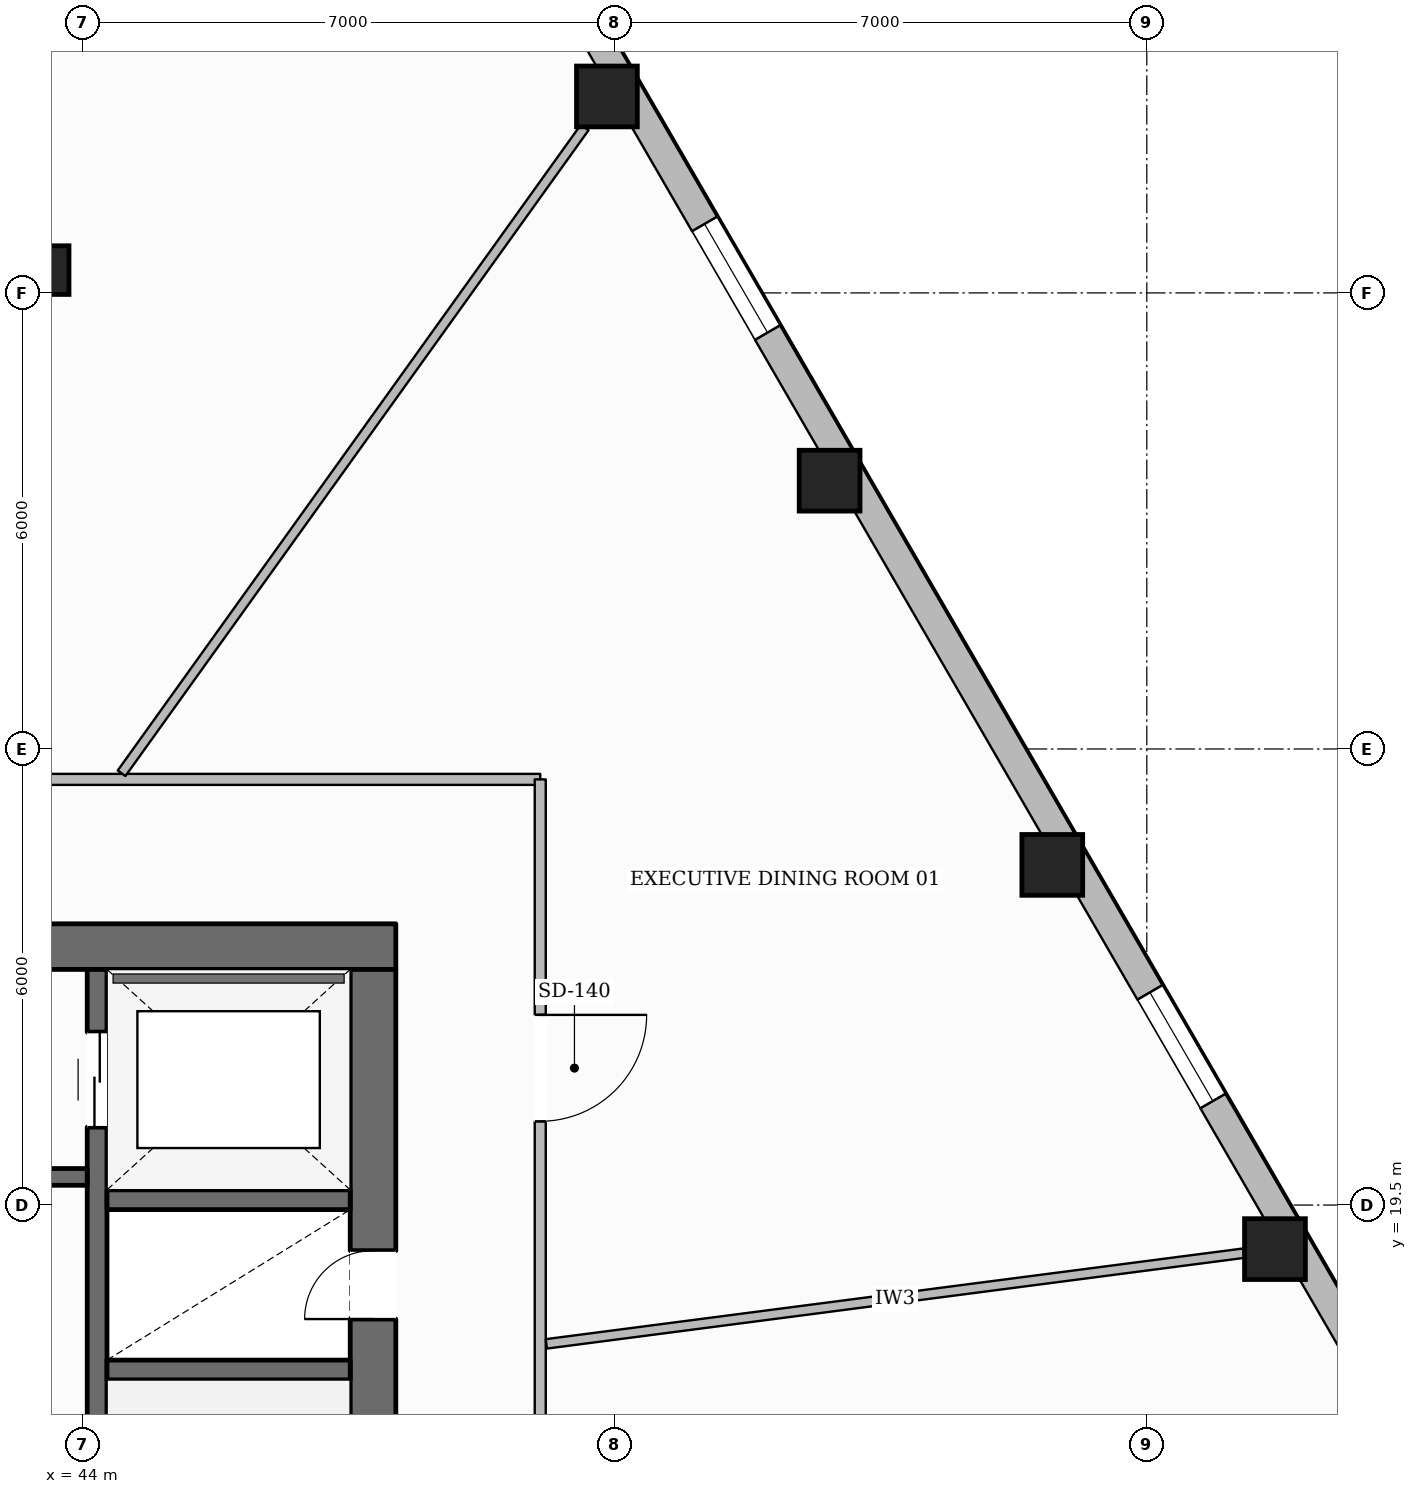
"""IFC4 building model, lengths in metres.
Left out: names, types, materials, properties, quantities, classifications, styles, units other than length and angle.
Written with IfcOpenShell. Run it as: python <this file> out.ifc"""

import sys

from ifc_helpers import new_model, si_unit, direction, frame, frame_2d, origin, origin_2d, place, context, subcontext, project, spatial, rectangle, hollow_rectangle, extrude, element, fill, save


model = new_model("IFC4")
c1 = context("Model", 3, precision=1e-05, world=origin(), true_north=direction((0.0, 1.0)))
c2 = subcontext(c1, "Body", "Model", "MODEL_VIEW")
j1 = project(units=[si_unit("LENGTHUNIT", "METRE"), si_unit("PLANEANGLEUNIT", "RADIAN")], contexts=[c1])
p1 = place(None, origin())
s1 = spatial("IfcSite", under=j1, at=p1, CompositionType="ELEMENT")
p2 = place(p1, origin())
s2 = spatial("IfcBuilding", under=s1, at=p2, CompositionType="ELEMENT")
p3 = place(p2, frame((0.0, 0.0, 67.6)))
s3 = spatial("IfcBuildingStorey", under=s2, at=p3, CompositionType="ELEMENT", Elevation=67.6)
p4 = place(p3, frame((27.88, 22.9, 0.0), z_axis=(0.0, 0.0, 1.0), x_axis=(1.0, 0.0, 0.0)))
e1 = element("IfcWall", 1, at=p4, inside=s3, PredefinedType="SOLIDWALL", context=c2, shape_type="SweptSolid", body=[
    extrude(rectangle(XDim=20.24, YDim=0.6, at=frame_2d((10.12, 0.0))), origin(), (0.0, 0.0, 1.0), 3.59),
])
p5 = place(p4, frame((6.395, 0.0, 0.0)))
e2 = element("IfcOpeningElement", 2, at=p5, cuts=e1, PredefinedType="OPENING", context=c2, shape_type="SweptSolid", body=[
    extrude(rectangle(XDim=1.05, YDim=2.15, at=frame_2d((0.525, 1.075))), frame((0.0, 0.31, 0.0), z_axis=(0.0, -1.0, 0.0), x_axis=(1.0, 0.0, 0.0)), (0.0, 0.0, 1.0), 0.62),
])
p6 = place(p4, frame((12.795, 0.0, 0.0)))
e3 = element("IfcOpeningElement", 3, at=p6, cuts=e1, PredefinedType="OPENING", context=c2, shape_type="SweptSolid", body=[
    extrude(rectangle(XDim=1.05, YDim=2.15, at=frame_2d((0.525, 1.075))), frame((0.0, 0.31, 0.0), z_axis=(0.0, -1.0, 0.0), x_axis=(1.0, 0.0, 0.0)), (0.0, 0.0, 1.0), 0.62),
])
p7 = place(p3, frame((47.82, 9.6, 0.0), z_axis=(0.0, 0.0, 1.0), x_axis=(0.0, 1.0, 0.0)))
e4 = element("IfcWall", 4, at=p7, inside=s3, PredefinedType="SOLIDWALL", context=c2, shape_type="SweptSolid", body=[
    extrude(rectangle(XDim=13.0, YDim=0.6, at=frame_2d((6.5, 0.0))), origin(), (0.0, 0.0, 1.0), 3.59),
])
p8 = place(p7, frame((0.2, 0.0, 0.0)))
e5 = element("IfcOpeningElement", 5, at=p8, cuts=e4, PredefinedType="OPENING", context=c2, shape_type="SweptSolid", body=[
    extrude(rectangle(XDim=1.1, YDim=2.15, at=frame_2d((0.55, 1.075))), frame((0.0, 0.31, 0.0), z_axis=(0.0, -1.0, 0.0), x_axis=(1.0, 0.0, 0.0)), (0.0, 0.0, 1.0), 0.62),
])
p9 = place(p7, frame((8.4, 0.0, 0.0)))
e6 = element("IfcOpeningElement", 6, at=p9, cuts=e4, PredefinedType="OPENING", context=c2, shape_type="SweptSolid", body=[
    extrude(rectangle(XDim=0.9, YDim=2.1, at=frame_2d((0.45, 1.05))), frame((0.0, 0.31, 0.0), z_axis=(0.0, -1.0, 0.0), x_axis=(1.0, 0.0, 0.0)), (0.0, 0.0, 1.0), 0.62),
])
p10 = place(p3, frame((44.19, 9.6, 0.0), z_axis=(0.0, 0.0, 1.0), x_axis=(0.0, 1.0, 0.0)))
e7 = element("IfcWall", 7, at=p10, inside=s3, PredefinedType="SHEAR", context=c2, shape_type="SweptSolid", body=[
    extrude(rectangle(XDim=13.0, YDim=0.26, at=frame_2d((6.5, 0.0))), origin(), (0.0, 0.0, 1.0), 3.59),
])
p11 = place(p10, frame((10.925, 0.0, 0.0)))
e8 = element("IfcOpeningElement", 8, at=p11, cuts=e7, PredefinedType="OPENING", context=c2, shape_type="SweptSolid", body=[
    extrude(rectangle(XDim=1.25, YDim=2.25, at=frame_2d((0.625, 1.125))), frame((0.0, 0.14, 0.0), z_axis=(0.0, -1.0, 0.0), x_axis=(1.0, 0.0, 0.0)), (0.0, 0.0, 1.0), 0.28),
])
for number, where, z_axis, x_axis in (
    (9, (44.32, 17.33, 0.0), (0.0, 0.0, 1.0), (1.0, 0.0, 0.0)),
    (10, (44.32, 19.57, 0.0), (0.0, 0.0, 1.0), (1.0, 0.0, 0.0)),
):
    element("IfcWall", number, at=place(p3, frame(where, z_axis=z_axis, x_axis=x_axis)), inside=s3, PredefinedType="SHEAR", context=c2, shape_type="SweptSolid", body=[
        extrude(rectangle(XDim=3.2, YDim=0.26, at=frame_2d((1.6, 0.0))), origin(), (0.0, 0.0, 1.0), 3.59),
    ])
p12 = place(p3, frame((31.94, 19.87, 0.0), z_axis=(0.0, 0.0, 1.0), x_axis=(1.0, 0.0, 0.0)))
e11 = element("IfcWall", 11, at=p12, inside=s3, PredefinedType="SOLIDWALL", context=c2, shape_type="SweptSolid", body=[
    extrude(rectangle(XDim=12.12, YDim=0.22, at=frame_2d((6.06, 0.0))), origin(), (0.0, 0.0, 1.0), 3.59),
])
p13 = place(p12, frame((6.3, 0.0, 0.0)))
e12 = element("IfcOpeningElement", 12, at=p13, cuts=e11, PredefinedType="OPENING", context=c2, shape_type="SweptSolid", body=[
    extrude(rectangle(XDim=1.1, YDim=2.15, at=frame_2d((0.55, 1.075))), frame((0.0, 0.12, 0.0), z_axis=(0.0, -1.0, 0.0), x_axis=(1.0, 0.0, 0.0)), (0.0, 0.0, 1.0), 0.24),
])
p14 = place(p12, frame((8.01, 0.0, 0.0)))
e13 = element("IfcOpeningElement", 13, at=p14, cuts=e11, PredefinedType="OPENING", context=c2, shape_type="SweptSolid", body=[
    extrude(rectangle(XDim=0.9, YDim=2.1, at=frame_2d((0.45, 1.05))), frame((0.0, 0.12, 0.0), z_axis=(0.0, -1.0, 0.0), x_axis=(1.0, 0.0, 0.0)), (0.0, 0.0, 1.0), 0.24),
])
p15 = place(p12, frame((10.21, 0.0, 0.0)))
e14 = element("IfcOpeningElement", 14, at=p15, cuts=e11, PredefinedType="OPENING", context=c2, shape_type="SweptSolid", body=[
    extrude(rectangle(XDim=0.9, YDim=2.1, at=frame_2d((0.45, 1.05))), frame((0.0, 0.12, 0.0), z_axis=(0.0, -1.0, 0.0), x_axis=(1.0, 0.0, 0.0)), (0.0, 0.0, 1.0), 0.24),
])
for number, where, z_axis, x_axis in (
    (15, (59.686, 18.92, 0.0), (0.0, 0.0, 1.0), (1.0, 0.0, 0.0)),
    (16, (56.757, 23.975, 0.0), (0.0, 0.0, 1.0), (1.0, 0.0, 0.0)),
    (17, (53.827, 29.03, 0.0), (0.0, 0.0, 1.0), (1.0, 0.0, 0.0)),
    (18, (50.897, 34.084, 0.0), (0.0, 0.0, 1.0), (1.0, 0.0, 0.0)),
):
    element("IfcColumn", number, at=place(p3, frame(where, z_axis=z_axis, x_axis=x_axis)), inside=s3, PredefinedType="COLUMN", context=c2, shape_type="SweptSolid", body=[
        extrude(hollow_rectangle(XDim=0.8, YDim=0.8, WallThickness=0.036, at=origin_2d()), origin(), (0.0, 0.0, 1.0), 3.59),
    ])
p16 = place(p3, frame((43.5, 31.8, 0.0), z_axis=(0.0, 0.0, 1.0), x_axis=(1.0, 0.0, 0.0)))
e19 = element("IfcColumn", 19, at=p16, inside=s3, PredefinedType="COLUMN", context=c2, shape_type="SweptSolid", body=[
    extrude(hollow_rectangle(XDim=0.64, YDim=0.64, WallThickness=0.028, at=origin_2d()), origin(), (0.0, 0.0, 1.0), 3.59),
])
p17 = place(p3, frame((45.032, 44.743, 0.0), z_axis=(0.0, 0.0, 1.0), x_axis=(0.501444024373, -0.865190089183, 0.0)))
e20 = element("IfcWall", 20, at=p17, inside=s3, PredefinedType="STANDARD", context=c2, shape_type="SweptSolid", body=[
    extrude(rectangle(XDim=36.012, YDim=0.38, at=frame_2d((18.006, 0.0))), origin(), (0.0, 0.0, 1.0), 2.97),
])
p18 = place(p17, frame((31.786, 0.0, 0.65)))
e21 = element("IfcOpeningElement", 21, at=p18, cuts=e20, PredefinedType="OPENING", context=c2, shape_type="SweptSolid", body=[
    extrude(rectangle(XDim=1.65, YDim=1.75, at=frame_2d((0.825, 0.875))), frame((0.0, 0.2, 0.0), z_axis=(0.0, -1.0, 0.0), x_axis=(1.0, 0.0, 0.0)), (0.0, 0.0, 1.0), 0.4),
])
p19 = place(p17, frame((25.944, 0.0, 0.65)))
e22 = element("IfcOpeningElement", 22, at=p19, cuts=e20, PredefinedType="OPENING", context=c2, shape_type="SweptSolid", body=[
    extrude(rectangle(XDim=1.65, YDim=1.75, at=frame_2d((0.825, 0.875))), frame((0.0, 0.2, 0.0), z_axis=(0.0, -1.0, 0.0), x_axis=(1.0, 0.0, 0.0)), (0.0, 0.0, 1.0), 0.4),
])
p20 = place(p17, frame((14.259, 0.0, 0.65)))
e23 = element("IfcOpeningElement", 23, at=p20, cuts=e20, PredefinedType="OPENING", context=c2, shape_type="SweptSolid", body=[
    extrude(rectangle(XDim=1.65, YDim=1.75, at=frame_2d((0.825, 0.875))), frame((0.0, 0.2, 0.0), z_axis=(0.0, -1.0, 0.0), x_axis=(1.0, 0.0, 0.0)), (0.0, 0.0, 1.0), 0.4),
])
p21 = place(p17, frame((8.417, 0.0, 0.65)))
e24 = element("IfcOpeningElement", 24, at=p21, cuts=e20, PredefinedType="OPENING", context=c2, shape_type="SweptSolid", body=[
    extrude(rectangle(XDim=1.65, YDim=1.75, at=frame_2d((0.825, 0.875))), frame((0.0, 0.2, 0.0), z_axis=(0.0, -1.0, 0.0), x_axis=(1.0, 0.0, 0.0)), (0.0, 0.0, 1.0), 0.4),
])
p22 = place(p17, frame((2.574, 0.0, 0.65)))
e25 = element("IfcOpeningElement", 25, at=p22, cuts=e20, PredefinedType="OPENING", context=c2, shape_type="SweptSolid", body=[
    extrude(rectangle(XDim=1.65, YDim=1.75, at=frame_2d((0.825, 0.875))), frame((0.0, 0.2, 0.0), z_axis=(0.0, -1.0, 0.0), x_axis=(1.0, 0.0, 0.0)), (0.0, 0.0, 1.0), 0.4),
])
p23 = place(p3, frame((39.0, 25.1, 0.0), z_axis=(0.0, 0.0, 1.0), x_axis=(1.0, 0.0, 0.0)))
e26 = element("IfcWall", 26, at=p23, inside=s3, PredefinedType="PARTITIONING", context=c2, shape_type="SweptSolid", body=[
    extrude(rectangle(XDim=11.02, YDim=0.145, at=frame_2d((5.51, 0.0))), origin(), (0.0, 0.0, 1.0), 3.59),
])
p24 = place(p3, frame((50.02, 25.1, 0.0), z_axis=(0.0, 0.0, 1.0), x_axis=(0.0, -1.0, 0.0)))
e27 = element("IfcWall", 27, at=p24, inside=s3, PredefinedType="PARTITIONING", context=c2, shape_type="SweptSolid", body=[
    extrude(rectangle(XDim=16.0, YDim=0.145, at=frame_2d((8.0, 0.0))), origin(), (0.0, 0.0, 1.0), 3.278),
])
p25 = place(p24, frame((3.098, 0.0, 0.0)))
e28 = element("IfcOpeningElement", 28, at=p25, cuts=e27, PredefinedType="OPENING", context=c2, shape_type="SweptSolid", body=[
    extrude(rectangle(XDim=1.4, YDim=2.2, at=frame_2d((0.7, 1.1))), frame((0.0, 0.083, 0.0), z_axis=(0.0, -1.0, 0.0), x_axis=(1.0, 0.0, 0.0)), (0.0, 0.0, 1.0), 0.165),
])
p26 = place(p24, frame((10.927, 0.0, 0.0)))
e29 = element("IfcOpeningElement", 29, at=p26, cuts=e27, PredefinedType="OPENING", context=c2, shape_type="SweptSolid", body=[
    extrude(rectangle(XDim=1.4, YDim=2.2, at=frame_2d((0.7, 1.1))), frame((0.0, 0.083, 0.0), z_axis=(0.0, -1.0, 0.0), x_axis=(1.0, 0.0, 0.0)), (0.0, 0.0, 1.0), 0.165),
])
p27 = place(p3, frame((50.101, 17.674, 0.0), z_axis=(0.0, 0.0, 1.0), x_axis=(0.991648297641, 0.128971523162, 0.0)))
e30 = element("IfcWall", 30, at=p27, inside=s3, PredefinedType="PARTITIONING", context=c2, shape_type="SweptSolid", body=[
    extrude(rectangle(XDim=9.255, YDim=0.125, at=frame_2d((4.627, 0.0))), origin(), (0.0, 0.0, 1.0), 3.057),
])
p28 = place(p3, frame((44.512, 25.18, 0.0), z_axis=(0.0, 0.0, 1.0), x_axis=(0.582750338363, 0.812651243239, 0.0)))
e31 = element("IfcWall", 31, at=p28, inside=s3, PredefinedType="PARTITIONING", context=c2, shape_type="SweptSolid", body=[
    extrude(rectangle(XDim=10.455, YDim=0.125, at=frame_2d((5.228, 0.0))), origin(), (0.0, 0.0, 1.0), 3.057),
])
p29 = place(p19, origin())
e32 = element("IfcWindow", 32, at=p29, inside=s3, PartitioningType="SINGLE_PANEL", PredefinedType="WINDOW", context=c2, shape_type="SweptSolid", body=[
    extrude(rectangle(XDim=1.65, YDim=1.75, at=frame_2d((0.825, 0.875))), frame((0.0, 0.03, 0.0), z_axis=(0.0, -1.0, 0.0), x_axis=(1.0, 0.0, 0.0)), (0.0, 0.0, 1.0), 0.06),
])
fill(e22, e32)
p30 = place(p20, origin())
e33 = element("IfcWindow", 33, at=p30, inside=s3, PartitioningType="SINGLE_PANEL", PredefinedType="WINDOW", context=c2, shape_type="SweptSolid", body=[
    extrude(rectangle(XDim=1.65, YDim=1.75, at=frame_2d((0.825, 0.875))), frame((0.0, 0.03, 0.0), z_axis=(0.0, -1.0, 0.0), x_axis=(1.0, 0.0, 0.0)), (0.0, 0.0, 1.0), 0.06),
])
fill(e23, e33)
p31 = place(p9, origin())
e34 = element("IfcDoor", 34, at=p31, inside=s3, OperationType="SINGLE_SWING_LEFT", PredefinedType="DOOR", context=c2, shape_type="SweptSolid", body=[
    extrude(rectangle(XDim=0.9, YDim=2.1, at=frame_2d((0.45, 1.05))), frame((0.0, 0.025, 0.0), z_axis=(0.0, -1.0, 0.0), x_axis=(1.0, 0.0, 0.0)), (0.0, 0.0, 1.0), 0.05),
])
fill(e6, e34)
p32 = place(p11, origin())
e35 = element("IfcDoor", 35, at=p32, inside=s3, OperationType="DOUBLE_DOOR_SLIDING", PredefinedType="DOOR", context=c2, shape_type="SweptSolid", body=[
    extrude(rectangle(XDim=1.25, YDim=2.25, at=frame_2d((0.625, 1.125))), frame((0.0, 0.025, 0.0), z_axis=(0.0, -1.0, 0.0), x_axis=(1.0, 0.0, 0.0)), (0.0, 0.0, 1.0), 0.05),
])
fill(e8, e35)
p33 = place(p25, origin())
e36 = element("IfcDoor", 36, at=p33, inside=s3, OperationType="SINGLE_SWING_LEFT", PredefinedType="DOOR", context=c2, shape_type="SweptSolid", body=[
    extrude(rectangle(XDim=1.4, YDim=2.2, at=frame_2d((0.7, 1.1))), frame((0.0, 0.025, 0.0), z_axis=(0.0, -1.0, 0.0), x_axis=(1.0, 0.0, 0.0)), (0.0, 0.0, 1.0), 0.05),
])
fill(e28, e36)
save(model, sys.argv[1])
